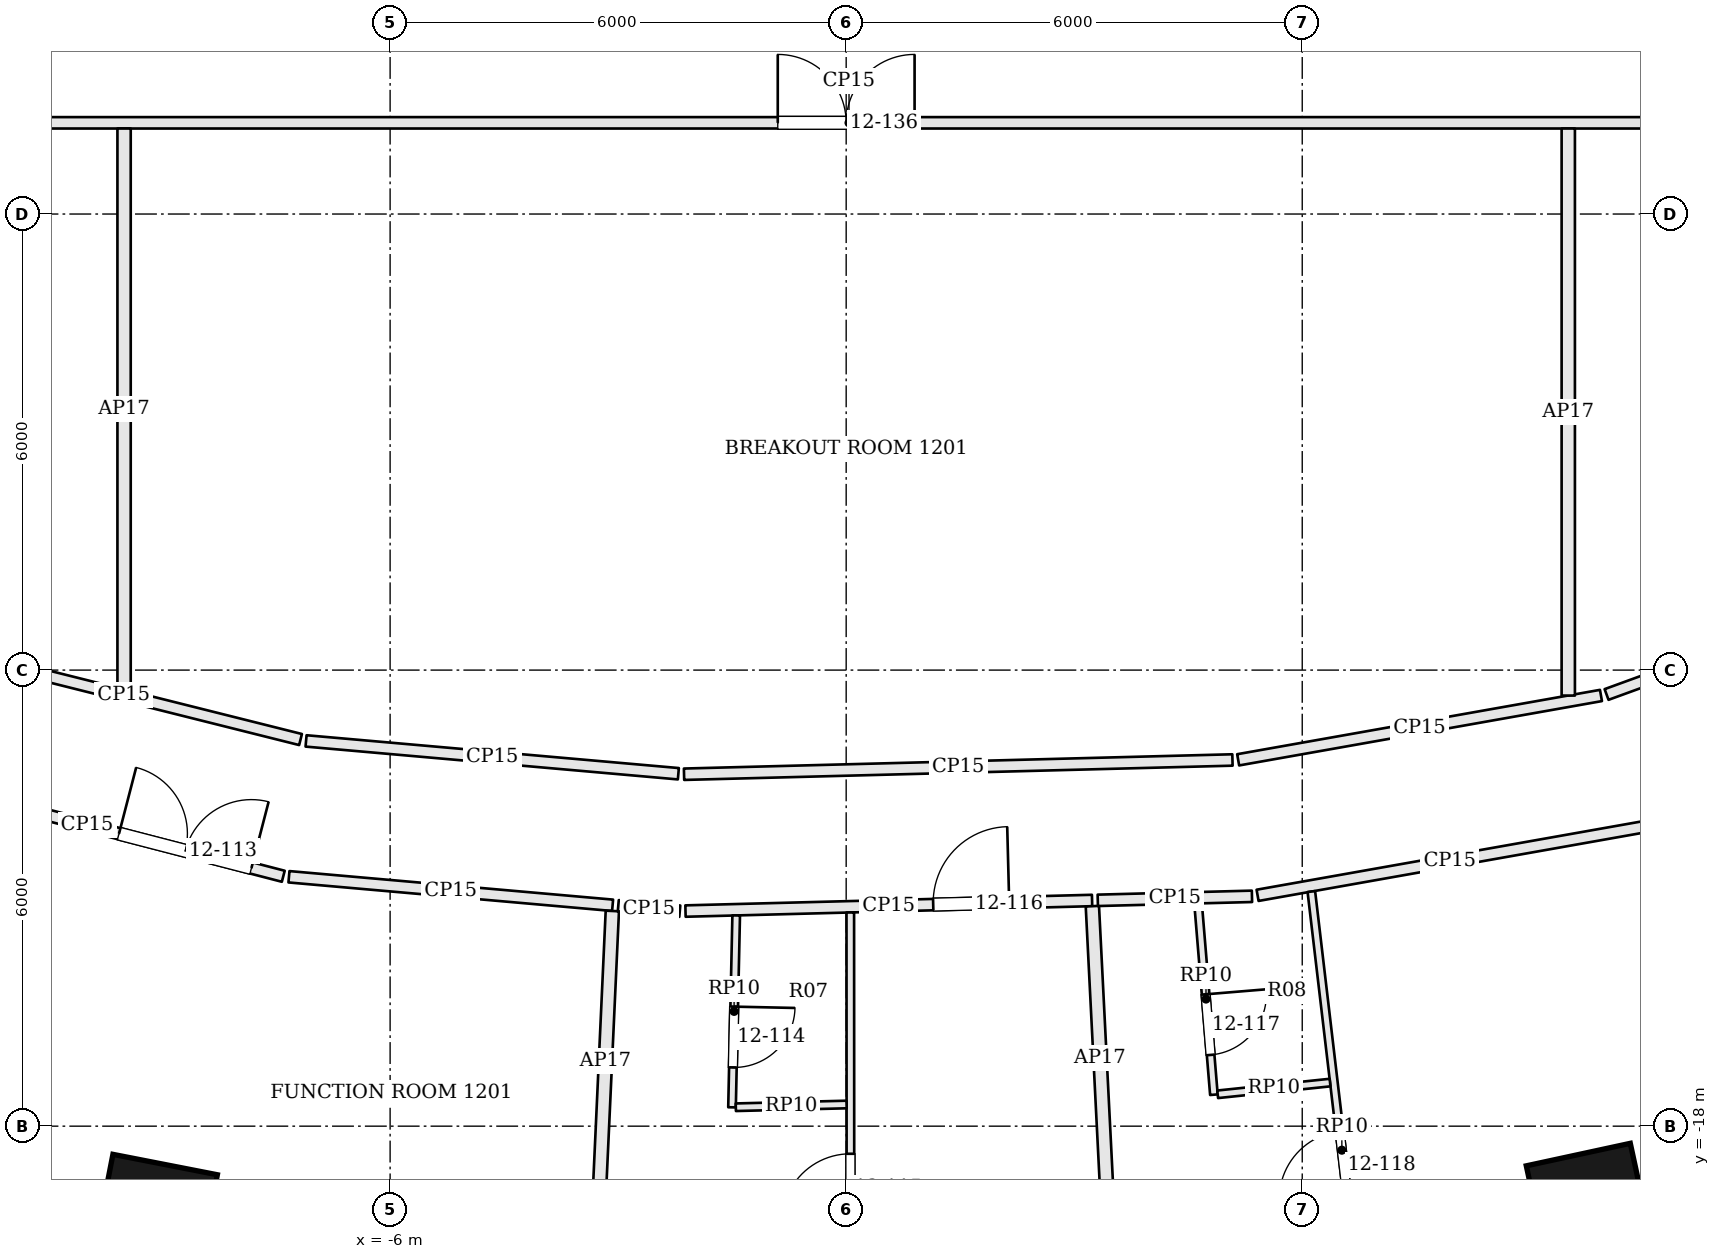
"""IFC4 building model, lengths in metres.
Left out: names, types, materials, properties, quantities, classifications, styles, units other than length and angle.
Written with IfcOpenShell. Run it as: python <this file> out.ifc"""

import sys

from ifc_helpers import new_model, si_unit, direction, frame, frame_2d, origin, origin_2d, place, context, subcontext, project, spatial, rectangle, extrude, element, fill, save


model = new_model("IFC4")
c1 = context("Model", 3, precision=1e-05, world=origin(), true_north=direction((0.0, 1.0)))
c2 = subcontext(c1, "Body", "Model", "MODEL_VIEW")
j1 = project(units=[si_unit("LENGTHUNIT", "METRE"), si_unit("PLANEANGLEUNIT", "RADIAN")], contexts=[c1])
p1 = place(None, origin())
s1 = spatial("IfcSite", under=j1, at=p1, CompositionType="ELEMENT")
p2 = place(p1, origin())
s2 = spatial("IfcBuilding", under=s1, at=p2, CompositionType="ELEMENT")
p3 = place(p2, frame((0.0, 0.0, 59.1)))
s3 = spatial("IfcBuildingStorey", under=s2, at=p3, CompositionType="ELEMENT", Elevation=59.1)
for number, where, z_axis, x_axis in (
    (1, (-9.094, -19.192, 0.0), (0.0, 0.0, 1.0), (0.981, -0.192, 0.0)),
    (2, (9.78, -19.058, 0.0), (0.0, 0.0, 1.0), (0.977, 0.211, 0.0)),
):
    element("IfcColumn", number, at=place(p3, frame(where, z_axis=z_axis, x_axis=x_axis)), inside=s3, PredefinedType="COLUMN", context=c2, shape_type="SweptSolid", body=[
        extrude(rectangle(XDim=1.4, YDim=1.4, at=origin_2d()), origin(), (0.0, 0.0, 1.0), 3.6),
    ])
p4 = place(p3, frame((-12.567, -13.374, 0.0), z_axis=(0.0, 0.0, 1.0), x_axis=(0.96798041907, -0.251025712423, 0.0)))
e3 = element("IfcWall", 3, at=p4, inside=s3, PredefinedType="PARTITIONING", context=c2, shape_type="SweptSolid", body=[
    extrude(rectangle(XDim=5.333, YDim=0.15, at=frame_2d((2.666, 0.0))), origin(), (0.0, 0.0, 1.0), 2.68),
])
p5 = place(p4, frame((3.1, 0.0, 0.0)))
e4 = element("IfcOpeningElement", 4, at=p5, cuts=e3, PredefinedType="OPENING", context=c2, shape_type="SweptSolid", body=[
    extrude(rectangle(XDim=1.8, YDim=2.1, at=frame_2d((0.9, 1.05))), frame((0.0, 0.085, 0.0), z_axis=(0.0, -1.0, 0.0), x_axis=(1.0, 0.0, 0.0)), (0.0, 0.0, 1.0), 0.17),
])
p6 = place(p3, frame((-7.331, -14.719, 0.0), z_axis=(0.0, 0.0, 1.0), x_axis=(0.996138963942, -0.087790458003, 0.0)))
e5 = element("IfcWall", 5, at=p6, inside=s3, PredefinedType="PARTITIONING", context=c2, shape_type="SweptSolid", body=[
    extrude(rectangle(XDim=4.274, YDim=0.15, at=frame_2d((2.137, 0.0))), origin(), (0.0, 0.0, 1.0), 2.68),
])
p7 = place(p3, frame((-3.257, -19.111, 0.0), z_axis=(0.0, 0.0, 1.0), x_axis=(0.045789384655, 0.998951116048, 0.0)))
e6 = element("IfcWall", 6, at=p7, inside=s3, PredefinedType="PARTITIONING", context=c2, shape_type="SweptSolid", body=[
    extrude(rectangle(XDim=3.946, YDim=0.175, at=frame_2d((1.973, 0.0))), origin(), (0.0, 0.0, 1.0), 2.68),
])
p8 = place(p3, frame((-2.998, -15.101, 0.0), z_axis=(0.0, 0.0, 1.0), x_axis=(0.996142993613, -0.087744722213, 0.0)))
e7 = element("IfcWall", 7, at=p8, inside=s3, PredefinedType="PARTITIONING", context=c2, shape_type="SweptSolid", body=[
    extrude(rectangle(XDim=0.812, YDim=0.15, at=frame_2d((0.406, 0.0))), origin(), (0.0, 0.0, 1.0), 2.68),
])
p9 = place(p3, frame((-2.114, -15.17, 0.0), z_axis=(0.0, 0.0, 1.0), x_axis=(0.99966176809, 0.02600671875, 0.0)))
e8 = element("IfcWall", 8, at=p9, inside=s3, PredefinedType="PARTITIONING", context=c2, shape_type="SweptSolid", body=[
    extrude(rectangle(XDim=5.351, YDim=0.15, at=frame_2d((2.675, 0.0))), origin(), (0.0, 0.0, 1.0), 2.68),
])
p10 = place(p9, frame((3.26, 0.0, 0.0)))
e9 = element("IfcOpeningElement", 9, at=p10, cuts=e8, PredefinedType="OPENING", context=c2, shape_type="SweptSolid", body=[
    extrude(rectangle(XDim=1.0, YDim=2.1, at=frame_2d((0.5, 1.05))), frame((0.0, 0.085, 0.0), z_axis=(0.0, -1.0, 0.0), x_axis=(1.0, 0.0, 0.0)), (0.0, 0.0, 1.0), 0.17),
])
p11 = place(p3, frame((3.441, -19.107, 0.0), z_axis=(0.0, 0.0, 1.0), x_axis=(-0.050399621173, 0.998729131539, 0.0)))
e10 = element("IfcWall", 10, at=p11, inside=s3, PredefinedType="PARTITIONING", context=c2, shape_type="SweptSolid", body=[
    extrude(rectangle(XDim=4.006, YDim=0.175, at=frame_2d((2.003, 0.0))), origin(), (0.0, 0.0, 1.0), 2.68),
])
p12 = place(p3, frame((3.31, -15.029, 0.0), z_axis=(0.0, 0.0, 1.0), x_axis=(0.99966219628, 0.025990254501, 0.0)))
e11 = element("IfcWall", 11, at=p12, inside=s3, PredefinedType="PARTITIONING", context=c2, shape_type="SweptSolid", body=[
    extrude(rectangle(XDim=2.029, YDim=0.15, at=frame_2d((1.015, 0.0))), origin(), (0.0, 0.0, 1.0), 2.68),
])
p13 = place(p3, frame((5.413, -14.963, 0.0), z_axis=(0.0, 0.0, 1.0), x_axis=(0.984633017555, 0.174636252655, 0.0)))
e12 = element("IfcWall", 12, at=p13, inside=s3, PredefinedType="PARTITIONING", context=c2, shape_type="SweptSolid", body=[
    extrude(rectangle(XDim=5.139, YDim=0.15, at=frame_2d((2.569, 0.0))), origin(), (0.0, 0.0, 1.0), 2.68),
])
p14 = place(p3, frame((13.511, -11.043, 0.0), z_axis=(0.0, 0.0, 1.0), x_axis=(-0.939583191704, -0.342320647736, 0.0)))
e13 = element("IfcWall", 13, at=p14, inside=s3, PredefinedType="PARTITIONING", context=c2, shape_type="SweptSolid", body=[
    extrude(rectangle(XDim=3.733, YDim=0.15, at=frame_2d((1.866, 0.0))), origin(), (0.0, 0.0, 1.0), 2.68),
])
p15 = place(p3, frame((9.93, -12.334, 0.0), z_axis=(0.0, 0.0, 1.0), x_axis=(-0.984638212434, -0.174606960386, 0.0)))
e14 = element("IfcWall", 14, at=p15, inside=s3, PredefinedType="PARTITIONING", context=c2, shape_type="SweptSolid", body=[
    extrude(rectangle(XDim=4.848, YDim=0.15, at=frame_2d((2.424, 0.0))), origin(), (0.0, 0.0, 1.0), 2.68),
])
p16 = place(p3, frame((5.082, -13.182, 0.0), z_axis=(0.0, 0.0, 1.0), x_axis=(-0.999661624383, -0.026012242045, 0.0)))
e15 = element("IfcWall", 15, at=p16, inside=s3, PredefinedType="PARTITIONING", context=c2, shape_type="SweptSolid", body=[
    extrude(rectangle(XDim=7.218, YDim=0.15, at=frame_2d((3.609, 0.0))), origin(), (0.0, 0.0, 1.0), 2.68),
])
p17 = place(p3, frame((-2.208, -13.364, 0.0), z_axis=(0.0, 0.0, 1.0), x_axis=(-0.996134962793, 0.087835846335, 0.0)))
e16 = element("IfcWall", 16, at=p17, inside=s3, PredefinedType="PARTITIONING", context=c2, shape_type="SweptSolid", body=[
    extrude(rectangle(XDim=4.917, YDim=0.15, at=frame_2d((2.458, 0.0))), origin(), (0.0, 0.0, 1.0), 2.68),
])
p18 = place(p3, frame((-7.178, -12.914, 0.0), z_axis=(0.0, 0.0, 1.0), x_axis=(-0.969983523639, 0.243170647628, 0.0)))
e17 = element("IfcWall", 17, at=p18, inside=s3, PredefinedType="PARTITIONING", context=c2, shape_type="SweptSolid", body=[
    extrude(rectangle(XDim=4.794, YDim=0.15, at=frame_2d((2.397, 0.0))), origin(), (0.0, 0.0, 1.0), 2.68),
])
p19 = place(p3, frame((-14.725, -4.8, 0.0), z_axis=(0.0, 0.0, 1.0), x_axis=(1.0, 0.0, 0.0)))
e18 = element("IfcWall", 18, at=p19, inside=s3, PredefinedType="PARTITIONING", context=c2, shape_type="SweptSolid", body=[
    extrude(rectangle(XDim=29.525, YDim=0.15, at=frame_2d((14.763, 0.0))), origin(), (0.0, 0.0, 1.0), 2.68),
])
p20 = place(p19, frame((13.825, 0.0, 0.0)))
e19 = element("IfcOpeningElement", 19, at=p20, cuts=e18, PredefinedType="OPENING", context=c2, shape_type="SweptSolid", body=[
    extrude(rectangle(XDim=1.8, YDim=2.1, at=frame_2d((0.9, 1.05))), frame((0.0, 0.085, 0.0), z_axis=(0.0, -1.0, 0.0), x_axis=(1.0, 0.0, 0.0)), (0.0, 0.0, 1.0), 0.17),
])
p21 = place(p3, frame((0.059, -24.339, 0.0), z_axis=(0.0, 0.0, 1.0), x_axis=(-0.000506923443, 0.999999871514, 0.0)))
e20 = element("IfcWall", 20, at=p21, inside=s3, PredefinedType="PARTITIONING", context=c2, shape_type="SweptSolid", body=[
    extrude(rectangle(XDim=9.151, YDim=0.1, at=frame_2d((4.575, 0.0))), origin(), (0.0, 0.0, 1.0), 2.898),
])
p22 = place(p21, frame((5.076, 0.0, 0.0)))
e21 = element("IfcOpeningElement", 21, at=p22, cuts=e20, PredefinedType="OPENING", context=c2, shape_type="SweptSolid", body=[
    extrude(rectangle(XDim=0.9, YDim=2.4, at=frame_2d((0.45, 1.2))), frame((0.0, 0.06, 0.0), z_axis=(0.0, -1.0, 0.0), x_axis=(1.0, 0.0, 0.0)), (0.0, 0.0, 1.0), 0.12),
])
p23 = place(p3, frame((-1.447, -15.228, 0.0), z_axis=(0.0, 0.0, 1.0), x_axis=(-0.02165836135, -0.99976543018, 0.0)))
e22 = element("IfcWall", 22, at=p23, inside=s3, PredefinedType="PARTITIONING", context=c2, shape_type="SweptSolid", body=[
    extrude(rectangle(XDim=2.525, YDim=0.1, at=frame_2d((1.262, 0.0))), origin(), (0.0, 0.0, 1.0), 2.898),
])
p24 = place(p23, frame((1.2, 0.0, 0.0)))
e23 = element("IfcOpeningElement", 23, at=p24, cuts=e22, PredefinedType="OPENING", context=c2, shape_type="SweptSolid", body=[
    extrude(rectangle(XDim=0.8, YDim=2.1, at=frame_2d((0.4, 1.05))), frame((0.0, 0.06, 0.0), z_axis=(0.0, -1.0, 0.0), x_axis=(1.0, 0.0, 0.0)), (0.0, 0.0, 1.0), 0.12),
])
p25 = place(p3, frame((-1.452, -17.751, 0.0), z_axis=(0.0, 0.0, 1.0), x_axis=(0.999696887378, 0.024619775916, 0.0)))
e24 = element("IfcWall", 24, at=p25, inside=s3, PredefinedType="PARTITIONING", context=c2, shape_type="SweptSolid", body=[
    extrude(rectangle(XDim=1.458, YDim=0.1, at=frame_2d((0.729, 0.0))), origin(), (0.0, 0.0, 1.0), 2.898),
])
p26 = place(p3, frame((6.923, -21.718, 0.0), z_axis=(0.0, 0.0, 1.0), x_axis=(-0.117159623324, 0.993113096612, 0.0)))
e25 = element("IfcWall", 25, at=p26, inside=s3, PredefinedType="PARTITIONING", context=c2, shape_type="SweptSolid", body=[
    extrude(rectangle(XDim=6.852, YDim=0.1, at=frame_2d((3.426, 0.0))), origin(), (0.0, 0.0, 1.0), 2.898),
])
p27 = place(p26, frame((2.777, 0.0, 0.0)))
e26 = element("IfcOpeningElement", 26, at=p27, cuts=e25, PredefinedType="OPENING", context=c2, shape_type="SweptSolid", body=[
    extrude(rectangle(XDim=0.9, YDim=2.4, at=frame_2d((0.45, 1.2))), frame((0.0, 0.06, 0.0), z_axis=(0.0, -1.0, 0.0), x_axis=(1.0, 0.0, 0.0)), (0.0, 0.0, 1.0), 0.12),
])
p28 = place(p3, frame((4.63, -15.07, 0.0), z_axis=(0.0, 0.0, 1.0), x_axis=(0.08247732406, -0.996592941484, 0.0)))
e27 = element("IfcWall", 27, at=p28, inside=s3, PredefinedType="PARTITIONING", context=c2, shape_type="SweptSolid", body=[
    extrude(rectangle(XDim=2.525, YDim=0.1, at=frame_2d((1.262, 0.0))), origin(), (0.0, 0.0, 1.0), 2.898),
])
p29 = place(p28, frame((1.2, 0.0, 0.0)))
e28 = element("IfcOpeningElement", 28, at=p29, cuts=e27, PredefinedType="OPENING", context=c2, shape_type="SweptSolid", body=[
    extrude(rectangle(XDim=0.8, YDim=2.1, at=frame_2d((0.4, 1.05))), frame((0.0, 0.06, 0.0), z_axis=(0.0, -1.0, 0.0), x_axis=(1.0, 0.0, 0.0)), (0.0, 0.0, 1.0), 0.12),
])
p30 = place(p3, frame((4.888, -17.581, 0.0), z_axis=(0.0, 0.0, 1.0), x_axis=(0.994596876319, 0.103812588907, 0.0)))
e29 = element("IfcWall", 29, at=p30, inside=s3, PredefinedType="PARTITIONING", context=c2, shape_type="SweptSolid", body=[
    extrude(rectangle(XDim=1.486, YDim=0.1, at=frame_2d((0.743, 0.0))), origin(), (0.0, 0.0, 1.0), 2.898),
])
p31 = place(p3, frame((-9.5, -12.257, 0.0), z_axis=(0.0, 0.0, 1.0), x_axis=(0.0, 1.0, 0.0)))
e30 = element("IfcWall", 30, at=p31, inside=s3, PredefinedType="PARTITIONING", context=c2, shape_type="SweptSolid", body=[
    extrude(rectangle(XDim=7.382, YDim=0.175, at=frame_2d((3.691, 0.0))), origin(), (0.0, 0.0, 1.0), 2.68),
])
p32 = place(p3, frame((9.5, -12.335, 0.0), z_axis=(0.0, 0.0, 1.0), x_axis=(0.0, 1.0, 0.0)))
e31 = element("IfcWall", 31, at=p32, inside=s3, PredefinedType="PARTITIONING", context=c2, shape_type="SweptSolid", body=[
    extrude(rectangle(XDim=7.46, YDim=0.175, at=frame_2d((3.73, 0.0))), origin(), (0.0, 0.0, 1.0), 2.68),
])
p33 = place(p5, origin())
e32 = element("IfcDoor", 32, at=p33, inside=s3, OperationType="DOUBLE_DOOR_SINGLE_SWING", PredefinedType="DOOR", context=c2, shape_type="SweptSolid", body=[
    extrude(rectangle(XDim=1.8, YDim=2.1, at=frame_2d((0.9, 1.05))), frame((0.0, 0.025, 0.0), z_axis=(0.0, -1.0, 0.0), x_axis=(1.0, 0.0, 0.0)), (0.0, 0.0, 1.0), 0.05),
])
fill(e4, e32)
p34 = place(p24, origin())
e33 = element("IfcDoor", 33, at=p34, inside=s3, OperationType="SINGLE_SWING_LEFT", PredefinedType="DOOR", context=c2, shape_type="SweptSolid", body=[
    extrude(rectangle(XDim=0.8, YDim=2.1, at=frame_2d((0.4, 1.05))), frame((0.0, 0.025, 0.0), z_axis=(0.0, -1.0, 0.0), x_axis=(1.0, 0.0, 0.0)), (0.0, 0.0, 1.0), 0.05),
])
fill(e23, e33)
p35 = place(p22, origin())
e34 = element("IfcDoor", 34, at=p35, inside=s3, OperationType="SINGLE_SWING_LEFT", PredefinedType="DOOR", context=c2, shape_type="SweptSolid", body=[
    extrude(rectangle(XDim=0.9, YDim=2.4, at=frame_2d((0.45, 1.2))), frame((0.0, 0.025, 0.0), z_axis=(0.0, -1.0, 0.0), x_axis=(1.0, 0.0, 0.0)), (0.0, 0.0, 1.0), 0.05),
])
fill(e21, e34)
p36 = place(p10, origin())
e35 = element("IfcDoor", 35, at=p36, inside=s3, OperationType="SINGLE_SWING_RIGHT", PredefinedType="DOOR", context=c2, shape_type="SweptSolid", body=[
    extrude(rectangle(XDim=1.0, YDim=2.1, at=frame_2d((0.5, 1.05))), frame((0.0, 0.025, 0.0), z_axis=(0.0, -1.0, 0.0), x_axis=(1.0, 0.0, 0.0)), (0.0, 0.0, 1.0), 0.05),
])
fill(e9, e35)
p37 = place(p29, origin())
e36 = element("IfcDoor", 36, at=p37, inside=s3, OperationType="SINGLE_SWING_LEFT", PredefinedType="DOOR", context=c2, shape_type="SweptSolid", body=[
    extrude(rectangle(XDim=0.8, YDim=2.1, at=frame_2d((0.4, 1.05))), frame((0.0, 0.025, 0.0), z_axis=(0.0, -1.0, 0.0), x_axis=(1.0, 0.0, 0.0)), (0.0, 0.0, 1.0), 0.05),
])
fill(e28, e36)
p38 = place(p27, origin())
e37 = element("IfcDoor", 37, at=p38, inside=s3, OperationType="SINGLE_SWING_LEFT", PredefinedType="DOOR", context=c2, shape_type="SweptSolid", body=[
    extrude(rectangle(XDim=0.9, YDim=2.4, at=frame_2d((0.45, 1.2))), frame((0.0, 0.025, 0.0), z_axis=(0.0, -1.0, 0.0), x_axis=(1.0, 0.0, 0.0)), (0.0, 0.0, 1.0), 0.05),
])
fill(e26, e37)
p39 = place(p20, origin())
e38 = element("IfcDoor", 38, at=p39, inside=s3, OperationType="DOUBLE_DOOR_SINGLE_SWING", PredefinedType="DOOR", context=c2, shape_type="SweptSolid", body=[
    extrude(rectangle(XDim=1.8, YDim=2.1, at=frame_2d((0.9, 1.05))), frame((0.0, 0.025, 0.0), z_axis=(0.0, -1.0, 0.0), x_axis=(1.0, 0.0, 0.0)), (0.0, 0.0, 1.0), 0.05),
])
fill(e19, e38)
save(model, sys.argv[1])
